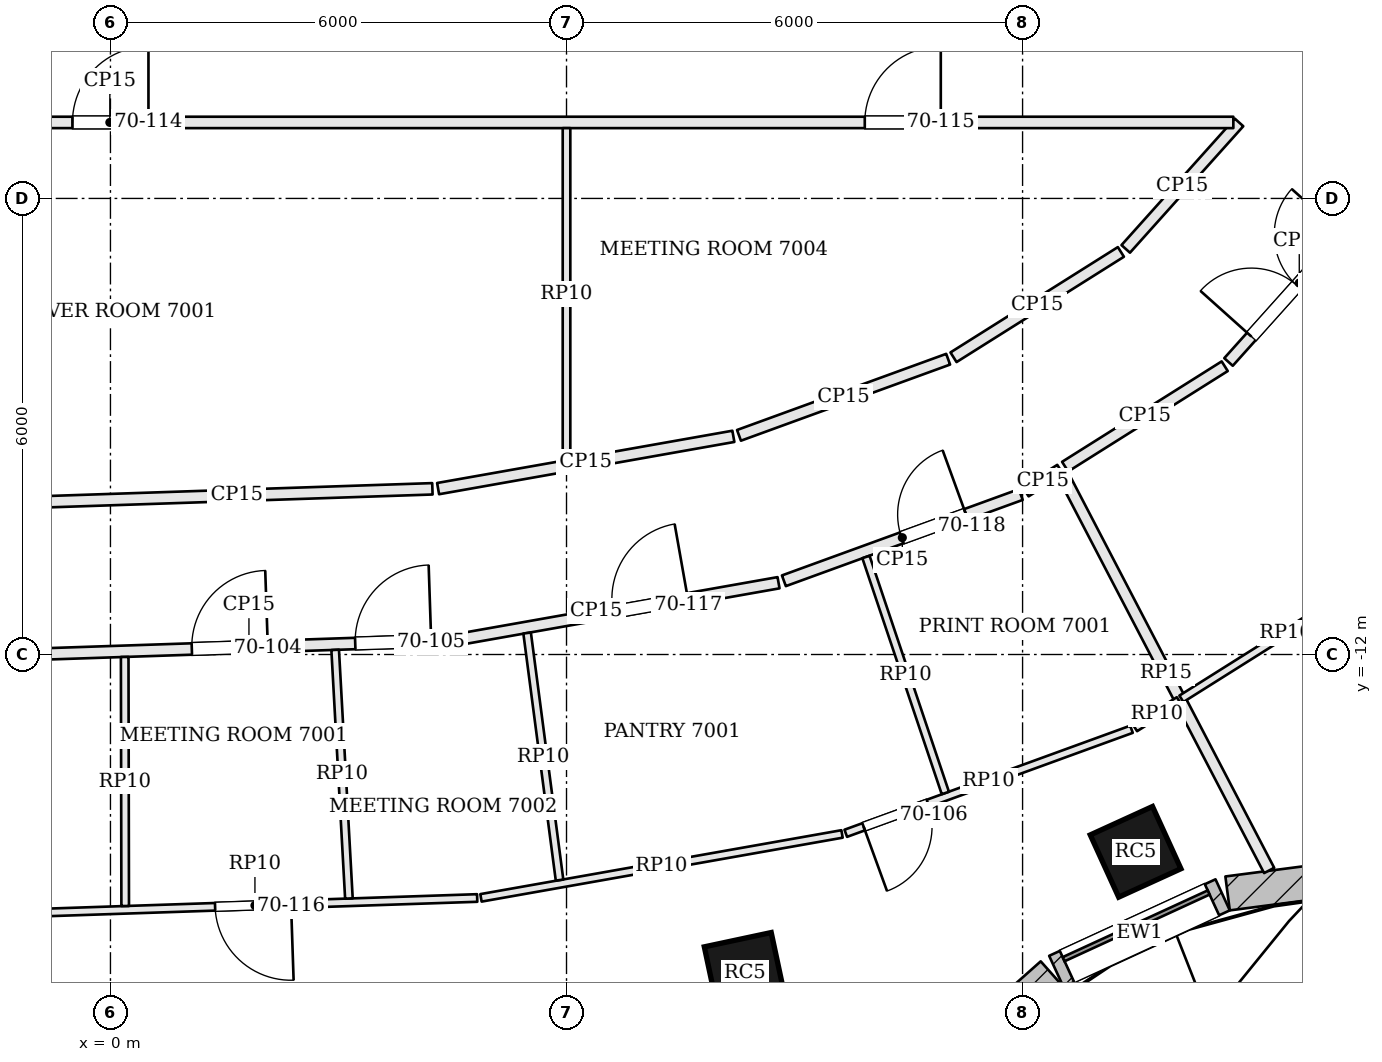
"""IFC4 building model, lengths in metres.
Left out: names, types, materials, properties, quantities, classifications, styles, units other than length and angle.
Written with IfcOpenShell. Run it as: python <this file> out.ifc"""

import sys

from ifc_helpers import new_model, si_unit, direction, frame, frame_2d, origin, origin_2d, place, context, subcontext, project, spatial, rectangle, extrude, element, fill, save


model = new_model("IFC4")
c1 = context("Model", 3, precision=1e-05, world=origin(), true_north=direction((0.0, 1.0)))
c2 = subcontext(c1, "Body", "Model", "MODEL_VIEW")
j1 = project(units=[si_unit("LENGTHUNIT", "METRE"), si_unit("PLANEANGLEUNIT", "RADIAN")], contexts=[c1])
p1 = place(None, origin())
s1 = spatial("IfcSite", under=j1, at=p1, CompositionType="ELEMENT")
p2 = place(p1, origin())
s2 = spatial("IfcBuilding", under=s1, at=p2, CompositionType="ELEMENT")
p3 = place(p2, frame((0.0, 0.0, 284.4)))
s3 = spatial("IfcBuildingStorey", under=s2, at=p3, CompositionType="ELEMENT", Elevation=284.4)
for number, where, z_axis, x_axis in (
    (1, (8.347, -16.192, 0.0), (0.0, 0.0, 1.0), (0.978, 0.209, 0.0)),
    (2, (13.487, -14.596, 0.0), (0.0, 0.0, 1.0), (0.91, 0.415, 0.0)),
):
    element("IfcColumn", number, at=place(p3, frame(where, z_axis=z_axis, x_axis=x_axis)), inside=s3, PredefinedType="COLUMN", context=c2, shape_type="SweptSolid", body=[
        extrude(rectangle(XDim=0.9, YDim=0.9, at=origin_2d()), origin(), (0.0, 0.0, 1.0), 3.9),
    ])
p4 = place(p3, frame((9.21, -19.03, 0.0), z_axis=(0.0, 0.0, 1.0), x_axis=(0.747396648191, 0.664378092861, 0.0)))
e3 = element("IfcWall", 3, at=p4, inside=s3, PredefinedType="SOLIDWALL", context=c2, shape_type="SweptSolid", body=[
    extrude(rectangle(XDim=4.252, YDim=0.45, at=frame_2d((2.126, 0.0))), origin(), (0.0, 0.0, 1.0), 3.7),
])
p5 = place(p4, frame((1.076, 0.0, 0.9)))
e4 = element("IfcOpeningElement", 4, at=p5, cuts=e3, PredefinedType="OPENING", context=c2, shape_type="SweptSolid", body=[
    extrude(rectangle(XDim=2.1, YDim=2.3, at=frame_2d((1.05, 1.15))), frame((0.0, 0.235, 0.0), z_axis=(0.0, -1.0, 0.0), x_axis=(1.0, 0.0, 0.0)), (0.0, 0.0, 1.0), 0.47),
])
p6 = place(p3, frame((12.444, -16.169, 0.0), z_axis=(0.0, 0.0, 1.0), x_axis=(0.908468904074, 0.417952449844, 0.0)))
e5 = element("IfcWall", 5, at=p6, inside=s3, PredefinedType="SOLIDWALL", context=c2, shape_type="SweptSolid", body=[
    extrude(rectangle(XDim=2.409, YDim=0.45, at=frame_2d((1.205, 0.0))), origin(), (0.0, 0.0, 1.0), 3.7),
])
p7 = place(p6, frame((0.155, 0.0, 0.9)))
e6 = element("IfcOpeningElement", 6, at=p7, cuts=e5, PredefinedType="OPENING", context=c2, shape_type="SweptSolid", body=[
    extrude(rectangle(XDim=2.1, YDim=2.3, at=frame_2d((1.05, 1.15))), frame((0.0, 0.235, 0.0), z_axis=(0.0, -1.0, 0.0), x_axis=(1.0, 0.0, 0.0)), (0.0, 0.0, 1.0), 0.47),
])
p8 = place(p3, frame((14.697, -15.143, 0.0), z_axis=(0.0, 0.0, 1.0), x_axis=(0.991631798411, 0.129098320597, 0.0)))
e7 = element("IfcWall", 7, at=p8, inside=s3, PredefinedType="SOLIDWALL", context=c2, shape_type="SweptSolid", body=[
    extrude(rectangle(XDim=5.547, YDim=0.45, at=frame_2d((2.773, 0.0))), origin(), (0.0, 0.0, 1.0), 3.7),
])
p9 = place(p8, frame((1.723, 0.0, 0.9)))
e8 = element("IfcOpeningElement", 8, at=p9, cuts=e7, PredefinedType="OPENING", context=c2, shape_type="SweptSolid", body=[
    extrude(rectangle(XDim=2.1, YDim=2.3, at=frame_2d((1.05, 1.15))), frame((0.0, 0.235, 0.0), z_axis=(0.0, -1.0, 0.0), x_axis=(1.0, 0.0, 0.0)), (0.0, 0.0, 1.0), 0.47),
])
p10 = place(p3, frame((-0.875, -11.993, 0.0), z_axis=(0.0, 0.0, 1.0), x_axis=(0.999436745295, 0.033558786542, 0.0)))
e9 = element("IfcWall", 9, at=p10, inside=s3, PredefinedType="PARTITIONING", context=c2, shape_type="SweptSolid", body=[
    extrude(rectangle(XDim=5.398, YDim=0.15, at=frame_2d((2.699, 0.0))), origin(), (0.0, 0.0, 1.0), 3.198),
])
p11 = place(p10, frame((1.947, 0.0, 0.0)))
e10 = element("IfcOpeningElement", 10, at=p11, cuts=e9, PredefinedType="OPENING", context=c2, shape_type="SweptSolid", body=[
    extrude(rectangle(XDim=1.0, YDim=2.4, at=frame_2d((0.5, 1.2))), frame((0.0, 0.085, 0.0), z_axis=(0.0, -1.0, 0.0), x_axis=(1.0, 0.0, 0.0)), (0.0, 0.0, 1.0), 0.17),
])
p12 = place(p10, frame((4.098, 0.0, 0.0)))
e11 = element("IfcOpeningElement", 11, at=p12, cuts=e9, PredefinedType="OPENING", context=c2, shape_type="SweptSolid", body=[
    extrude(rectangle(XDim=1.0, YDim=2.4, at=frame_2d((0.5, 1.2))), frame((0.0, 0.085, 0.0), z_axis=(0.0, -1.0, 0.0), x_axis=(1.0, 0.0, 0.0)), (0.0, 0.0, 1.0), 0.17),
])
p13 = place(p3, frame((4.594, -11.799, 0.0), z_axis=(0.0, 0.0, 1.0), x_axis=(0.984693444773, 0.174295208833, 0.0)))
e12 = element("IfcWall", 12, at=p13, inside=s3, PredefinedType="PARTITIONING", context=c2, shape_type="SweptSolid", body=[
    extrude(rectangle(XDim=4.261, YDim=0.15, at=frame_2d((2.13, 0.0))), origin(), (0.0, 0.0, 1.0), 3.198),
])
p14 = place(p13, frame((2.05, 0.0, 0.0)))
e13 = element("IfcOpeningElement", 13, at=p14, cuts=e12, PredefinedType="OPENING", context=c2, shape_type="SweptSolid", body=[
    extrude(rectangle(XDim=1.0, YDim=2.1, at=frame_2d((0.5, 1.05))), frame((0.0, 0.085, 0.0), z_axis=(0.0, -1.0, 0.0), x_axis=(1.0, 0.0, 0.0)), (0.0, 0.0, 1.0), 0.17),
])
p15 = place(p3, frame((8.86, -11.03, 0.0), z_axis=(0.0, 0.0, 1.0), x_axis=(0.939685902536, 0.342038601001, 0.0)))
e14 = element("IfcWall", 14, at=p15, inside=s3, PredefinedType="PARTITIONING", context=c2, shape_type="SweptSolid", body=[
    extrude(rectangle(XDim=3.316, YDim=0.15, at=frame_2d((1.658, 0.0))), origin(), (0.0, 0.0, 1.0), 3.198),
])
p16 = place(p15, frame((1.65, 0.0, 0.0)))
e15 = element("IfcOpeningElement", 15, at=p16, cuts=e14, PredefinedType="OPENING", context=c2, shape_type="SweptSolid", body=[
    extrude(rectangle(XDim=0.9, YDim=2.1, at=frame_2d((0.45, 1.05))), frame((0.0, 0.085, 0.0), z_axis=(0.0, -1.0, 0.0), x_axis=(1.0, 0.0, 0.0)), (0.0, 0.0, 1.0), 0.17),
])
p17 = place(p3, frame((12.04, -9.856, 0.0), z_axis=(0.0, 0.0, 1.0), x_axis=(0.846240393033, 0.532801273647, 0.0)))
e16 = element("IfcWall", 16, at=p17, inside=s3, PredefinedType="PARTITIONING", context=c2, shape_type="SweptSolid", body=[
    extrude(rectangle(XDim=0.54, YDim=0.15, at=frame_2d((0.27, 0.0))), origin(), (0.0, 0.0, 1.0), 3.198),
])
p18 = place(p3, frame((15.244, -14.841, 0.0), z_axis=(0.0, 0.0, 1.0), x_axis=(-0.462122511499, 0.886816093881, 0.0)))
e17 = element("IfcWall", 17, at=p18, inside=s3, PredefinedType="PARTITIONING", context=c2, shape_type="SweptSolid", body=[
    extrude(rectangle(XDim=5.871, YDim=0.15, at=frame_2d((2.935, 0.0))), origin(), (0.0, 0.0, 1.0), 3.234),
])
p19 = place(p3, frame((12.56, -9.529, 0.0), z_axis=(0.0, 0.0, 1.0), x_axis=(0.846402081662, 0.53254437952, 0.0)))
e18 = element("IfcWall", 18, at=p19, inside=s3, PredefinedType="PARTITIONING", context=c2, shape_type="SweptSolid", body=[
    extrude(rectangle(XDim=2.481, YDim=0.15, at=frame_2d((1.24, 0.0))), origin(), (0.0, 0.0, 1.0), 3.198),
])
p20 = place(p3, frame((14.709, -8.152, 0.0), z_axis=(0.0, 0.0, 1.0), x_axis=(0.667275630306, 0.744810870758, 0.0)))
e19 = element("IfcWall", 19, at=p20, inside=s3, PredefinedType="PARTITIONING", context=c2, shape_type="SweptSolid", body=[
    extrude(rectangle(XDim=2.79, YDim=0.15, at=frame_2d((1.395, 0.0))), origin(), (0.0, 0.0, 1.0), 3.198),
])
p21 = place(p20, frame((0.45, 0.0, 0.0)))
e20 = element("IfcOpeningElement", 20, at=p21, cuts=e19, PredefinedType="OPENING", context=c2, shape_type="SweptSolid", body=[
    extrude(rectangle(XDim=1.8, YDim=2.1, at=frame_2d((0.9, 1.05))), frame((0.0, 0.085, 0.0), z_axis=(0.0, -1.0, 0.0), x_axis=(1.0, 0.0, 0.0)), (0.0, 0.0, 1.0), 0.17),
])
p22 = place(p3, frame((14.848, -5.0, 0.0), z_axis=(0.0, 0.0, 1.0), x_axis=(-0.667363249373, -0.744732363595, 0.0)))
e21 = element("IfcWall", 21, at=p22, inside=s3, PredefinedType="PARTITIONING", context=c2, shape_type="SweptSolid", body=[
    extrude(rectangle(XDim=2.234, YDim=0.15, at=frame_2d((1.117, 0.0))), origin(), (0.0, 0.0, 1.0), 3.198),
])
p23 = place(p3, frame((13.293, -6.704, 0.0), z_axis=(0.0, 0.0, 1.0), x_axis=(-0.84641299998, -0.532527026041, 0.0)))
e22 = element("IfcWall", 22, at=p23, inside=s3, PredefinedType="PARTITIONING", context=c2, shape_type="SweptSolid", body=[
    extrude(rectangle(XDim=2.602, YDim=0.15, at=frame_2d((1.301, 0.0))), origin(), (0.0, 0.0, 1.0), 3.198),
])
p24 = place(p3, frame((11.021, -8.115, 0.0), z_axis=(0.0, 0.0, 1.0), x_axis=(-0.939683845313, -0.342044252778, 0.0)))
e23 = element("IfcWall", 23, at=p24, inside=s3, PredefinedType="PARTITIONING", context=c2, shape_type="SweptSolid", body=[
    extrude(rectangle(XDim=2.929, YDim=0.15, at=frame_2d((1.464, 0.0))), origin(), (0.0, 0.0, 1.0), 3.198),
])
p25 = place(p3, frame((8.195, -9.13, 0.0), z_axis=(0.0, 0.0, 1.0), x_axis=(-0.9846880937, -0.174325437403, 0.0)))
e24 = element("IfcWall", 24, at=p25, inside=s3, PredefinedType="PARTITIONING", context=c2, shape_type="SweptSolid", body=[
    extrude(rectangle(XDim=3.945, YDim=0.15, at=frame_2d((1.973, 0.0))), origin(), (0.0, 0.0, 1.0), 3.198),
])
p26 = place(p3, frame((4.236, -9.82, 0.0), z_axis=(0.0, 0.0, 1.0), x_axis=(-0.999435760561, -0.033588100749, 0.0)))
e25 = element("IfcWall", 25, at=p26, inside=s3, PredefinedType="PARTITIONING", context=c2, shape_type="SweptSolid", body=[
    extrude(rectangle(XDim=5.146, YDim=0.15, at=frame_2d((2.573, 0.0))), origin(), (0.0, 0.0, 1.0), 3.198),
])
p27 = place(p3, frame((-14.789, -5.0, 0.0), z_axis=(0.0, 0.0, 1.0), x_axis=(1.0, 0.0, 0.0)))
e26 = element("IfcWall", 26, at=p27, inside=s3, PredefinedType="PARTITIONING", context=c2, shape_type="SweptSolid", body=[
    extrude(rectangle(XDim=29.562, YDim=0.15, at=frame_2d((14.781, 0.0))), origin(), (0.0, 0.0, 1.0), 3.198),
])
p28 = place(p27, frame((3.857, 0.0, 0.0)))
e27 = element("IfcOpeningElement", 27, at=p28, cuts=e26, PredefinedType="OPENING", context=c2, shape_type="SweptSolid", body=[
    extrude(rectangle(XDim=1.0, YDim=2.4, at=frame_2d((0.5, 1.2))), frame((0.0, 0.085, 0.0), z_axis=(0.0, -1.0, 0.0), x_axis=(1.0, 0.0, 0.0)), (0.0, 0.0, 1.0), 0.17),
])
p29 = place(p27, frame((14.289, 0.0, 0.0)))
e28 = element("IfcOpeningElement", 28, at=p29, cuts=e26, PredefinedType="OPENING", context=c2, shape_type="SweptSolid", body=[
    extrude(rectangle(XDim=1.0, YDim=2.1, at=frame_2d((0.5, 1.05))), frame((0.0, 0.085, 0.0), z_axis=(0.0, -1.0, 0.0), x_axis=(1.0, 0.0, 0.0)), (0.0, 0.0, 1.0), 0.17),
])
p30 = place(p27, frame((24.713, 0.0, 0.0)))
e29 = element("IfcOpeningElement", 29, at=p30, cuts=e26, PredefinedType="OPENING", context=c2, shape_type="SweptSolid", body=[
    extrude(rectangle(XDim=1.0, YDim=2.4, at=frame_2d((0.5, 1.2))), frame((0.0, 0.085, 0.0), z_axis=(0.0, -1.0, 0.0), x_axis=(1.0, 0.0, 0.0)), (0.0, 0.0, 1.0), 0.17),
])
p31 = place(p3, frame((14.056, -12.604, 0.0), z_axis=(0.0, 0.0, 1.0), x_axis=(-0.846544184051, -0.532318461496, 0.0)))
e30 = element("IfcWall", 30, at=p31, inside=s3, PredefinedType="PARTITIONING", context=c2, shape_type="SweptSolid", body=[
    extrude(rectangle(XDim=0.681, YDim=0.1, at=frame_2d((0.34, 0.0))), origin(), (0.0, 0.0, 1.0), 3.198),
])
p32 = place(p3, frame((13.433, -12.984, 0.0), z_axis=(0.0, 0.0, 1.0), x_axis=(-0.939673979614, -0.342071355182, 0.0)))
e31 = element("IfcWall", 31, at=p32, inside=s3, PredefinedType="PARTITIONING", context=c2, shape_type="SweptSolid", body=[
    extrude(rectangle(XDim=4.0, YDim=0.1, at=frame_2d((2.0, 0.0))), origin(), (0.0, 0.0, 1.0), 3.198),
])
p33 = place(p32, frame((2.85, 0.0, 0.0)))
e32 = element("IfcOpeningElement", 32, at=p33, cuts=e31, PredefinedType="OPENING", context=c2, shape_type="SweptSolid", body=[
    extrude(rectangle(XDim=0.9, YDim=2.1, at=frame_2d((0.45, 1.05))), frame((0.0, 0.06, 0.0), z_axis=(0.0, -1.0, 0.0), x_axis=(1.0, 0.0, 0.0)), (0.0, 0.0, 1.0), 0.12),
])
p34 = place(p3, frame((9.625, -14.361, 0.0), z_axis=(0.0, 0.0, 1.0), x_axis=(-0.984691710098, -0.174305008716, 0.0)))
e33 = element("IfcWall", 33, at=p34, inside=s3, PredefinedType="PARTITIONING", context=c2, shape_type="SweptSolid", body=[
    extrude(rectangle(XDim=4.824, YDim=0.1, at=frame_2d((2.412, 0.0))), origin(), (0.0, 0.0, 1.0), 3.198),
])
p35 = place(p3, frame((4.825, -15.203, 0.0), z_axis=(0.0, 0.0, 1.0), x_axis=(-0.999435699456, -0.033589918924, 0.0)))
e34 = element("IfcWall", 34, at=p35, inside=s3, PredefinedType="PARTITIONING", context=c2, shape_type="SweptSolid", body=[
    extrude(rectangle(XDim=5.851, YDim=0.1, at=frame_2d((2.926, 0.0))), origin(), (0.0, 0.0, 1.0), 3.198),
])
p36 = place(p35, frame((2.45, 0.0, 0.0)))
e35 = element("IfcOpeningElement", 35, at=p36, cuts=e34, PredefinedType="OPENING", context=c2, shape_type="SweptSolid", body=[
    extrude(rectangle(XDim=1.0, YDim=2.4, at=frame_2d((0.5, 1.2))), frame((0.0, 0.06, 0.0), z_axis=(0.0, -1.0, 0.0), x_axis=(1.0, 0.0, 0.0)), (0.0, 0.0, 1.0), 0.12),
])
p37 = place(p3, frame((0.188, -12.032, 0.0), z_axis=(0.0, 0.0, 1.0), x_axis=(0.001937258864, -0.999998123512, 0.0)))
e36 = element("IfcWall", 36, at=p37, inside=s3, PredefinedType="PARTITIONING", context=c2, shape_type="SweptSolid", body=[
    extrude(rectangle(XDim=3.277, YDim=0.1, at=frame_2d((1.638, 0.0))), origin(), (0.0, 0.0, 1.0), 3.198),
])
p38 = place(p3, frame((2.956, -11.939, 0.0), z_axis=(0.0, 0.0, 1.0), x_axis=(0.055226477976, -0.998473853504, 0.0)))
e37 = element("IfcWall", 37, at=p38, inside=s3, PredefinedType="PARTITIONING", context=c2, shape_type="SweptSolid", body=[
    extrude(rectangle(XDim=3.276, YDim=0.1, at=frame_2d((1.638, 0.0))), origin(), (0.0, 0.0, 1.0), 3.198),
])
p39 = place(p3, frame((5.482, -11.718, 0.0), z_axis=(0.0, 0.0, 1.0), x_axis=(0.130173255727, -0.991491262439, 0.0)))
e38 = element("IfcWall", 38, at=p39, inside=s3, PredefinedType="PARTITIONING", context=c2, shape_type="SweptSolid", body=[
    extrude(rectangle(XDim=3.278, YDim=0.1, at=frame_2d((1.639, 0.0))), origin(), (0.0, 0.0, 1.0), 3.198),
])
p40 = place(p3, frame((9.94, -10.717, 0.0), z_axis=(0.0, 0.0, 1.0), x_axis=(0.318730603816, -0.947845347191, 0.0)))
e39 = element("IfcWall", 39, at=p40, inside=s3, PredefinedType="PARTITIONING", context=c2, shape_type="SweptSolid", body=[
    extrude(rectangle(XDim=3.276, YDim=0.1, at=frame_2d((1.638, 0.0))), origin(), (0.0, 0.0, 1.0), 3.198),
])
p41 = place(p3, frame((16.831, -10.858, 0.0), z_axis=(0.0, 0.0, 1.0), x_axis=(-0.846427876971, -0.532503379413, 0.0)))
e40 = element("IfcWall", 40, at=p41, inside=s3, PredefinedType="PARTITIONING", context=c2, shape_type="SweptSolid", body=[
    extrude(rectangle(XDim=3.239, YDim=0.1, at=frame_2d((1.62, 0.0))), origin(), (0.0, 0.0, 1.0), 3.198),
])
p42 = place(p3, frame((6.0, -9.444, 0.0), z_axis=(0.0, 0.0, 1.0), x_axis=(0.0, 1.0, 0.0)))
e41 = element("IfcWall", 41, at=p42, inside=s3, PredefinedType="PARTITIONING", context=c2, shape_type="SweptSolid", body=[
    extrude(rectangle(XDim=4.369, YDim=0.1, at=frame_2d((2.184, 0.0))), origin(), (0.0, 0.0, 1.0), 3.198),
])
p43 = place(p7, origin())
e42 = element("IfcWindow", 42, at=p43, inside=s3, PartitioningType="SINGLE_PANEL", PredefinedType="WINDOW", context=c2, shape_type="SweptSolid", body=[
    extrude(rectangle(XDim=2.1, YDim=2.3, at=frame_2d((1.05, 1.15))), frame((0.0, 0.135, 0.0), z_axis=(0.0, -1.0, 0.0), x_axis=(1.0, 0.0, 0.0)), (0.0, 0.0, 1.0), 0.06),
])
fill(e6, e42)
p44 = place(p11, origin())
e43 = element("IfcDoor", 43, at=p44, inside=s3, OperationType="SINGLE_SWING_RIGHT", PredefinedType="DOOR", context=c2, shape_type="SweptSolid", body=[
    extrude(rectangle(XDim=1.0, YDim=2.4, at=frame_2d((0.5, 1.2))), frame((0.0, 0.025, 0.0), z_axis=(0.0, -1.0, 0.0), x_axis=(1.0, 0.0, 0.0)), (0.0, 0.0, 1.0), 0.05),
])
fill(e10, e43)
p45 = place(p12, origin())
e44 = element("IfcDoor", 44, at=p45, inside=s3, OperationType="SINGLE_SWING_RIGHT", PredefinedType="DOOR", context=c2, shape_type="SweptSolid", body=[
    extrude(rectangle(XDim=1.0, YDim=2.4, at=frame_2d((0.5, 1.2))), frame((0.0, 0.025, 0.0), z_axis=(0.0, -1.0, 0.0), x_axis=(1.0, 0.0, 0.0)), (0.0, 0.0, 1.0), 0.05),
])
fill(e11, e44)
p46 = place(p33, origin())
e45 = element("IfcDoor", 45, at=p46, inside=s3, OperationType="SINGLE_SWING_RIGHT", PredefinedType="DOOR", context=c2, shape_type="SweptSolid", body=[
    extrude(rectangle(XDim=0.9, YDim=2.1, at=frame_2d((0.45, 1.05))), frame((0.0, 0.025, 0.0), z_axis=(0.0, -1.0, 0.0), x_axis=(1.0, 0.0, 0.0)), (0.0, 0.0, 1.0), 0.05),
])
fill(e32, e45)
p47 = place(p21, origin())
e46 = element("IfcDoor", 46, at=p47, inside=s3, OperationType="DOUBLE_DOOR_SINGLE_SWING", PredefinedType="DOOR", context=c2, shape_type="SweptSolid", body=[
    extrude(rectangle(XDim=1.8, YDim=2.1, at=frame_2d((0.9, 1.05))), frame((0.0, 0.025, 0.0), z_axis=(0.0, -1.0, 0.0), x_axis=(1.0, 0.0, 0.0)), (0.0, 0.0, 1.0), 0.05),
])
fill(e20, e46)
p48 = place(p29, origin())
e47 = element("IfcDoor", 47, at=p48, inside=s3, OperationType="SINGLE_SWING_RIGHT", PredefinedType="DOOR", context=c2, shape_type="SweptSolid", body=[
    extrude(rectangle(XDim=1.0, YDim=2.1, at=frame_2d((0.5, 1.05))), frame((0.0, 0.025, 0.0), z_axis=(0.0, -1.0, 0.0), x_axis=(1.0, 0.0, 0.0)), (0.0, 0.0, 1.0), 0.05),
])
fill(e28, e47)
p49 = place(p30, origin())
e48 = element("IfcDoor", 48, at=p49, inside=s3, OperationType="SINGLE_SWING_RIGHT", PredefinedType="DOOR", context=c2, shape_type="SweptSolid", body=[
    extrude(rectangle(XDim=1.0, YDim=2.4, at=frame_2d((0.5, 1.2))), frame((0.0, 0.025, 0.0), z_axis=(0.0, -1.0, 0.0), x_axis=(1.0, 0.0, 0.0)), (0.0, 0.0, 1.0), 0.05),
])
fill(e29, e48)
p50 = place(p36, origin())
e49 = element("IfcDoor", 49, at=p50, inside=s3, OperationType="SINGLE_SWING_LEFT", PredefinedType="DOOR", context=c2, shape_type="SweptSolid", body=[
    extrude(rectangle(XDim=1.0, YDim=2.4, at=frame_2d((0.5, 1.2))), frame((0.0, 0.025, 0.0), z_axis=(0.0, -1.0, 0.0), x_axis=(1.0, 0.0, 0.0)), (0.0, 0.0, 1.0), 0.05),
])
fill(e35, e49)
p51 = place(p14, origin())
e50 = element("IfcDoor", 50, at=p51, inside=s3, OperationType="SINGLE_SWING_RIGHT", PredefinedType="DOOR", context=c2, shape_type="SweptSolid", body=[
    extrude(rectangle(XDim=1.0, YDim=2.1, at=frame_2d((0.5, 1.05))), frame((0.0, 0.025, 0.0), z_axis=(0.0, -1.0, 0.0), x_axis=(1.0, 0.0, 0.0)), (0.0, 0.0, 1.0), 0.05),
])
fill(e13, e50)
p52 = place(p16, origin())
e51 = element("IfcDoor", 51, at=p52, inside=s3, OperationType="SINGLE_SWING_RIGHT", PredefinedType="DOOR", context=c2, shape_type="SweptSolid", body=[
    extrude(rectangle(XDim=0.9, YDim=2.1, at=frame_2d((0.45, 1.05))), frame((0.0, 0.025, 0.0), z_axis=(0.0, -1.0, 0.0), x_axis=(1.0, 0.0, 0.0)), (0.0, 0.0, 1.0), 0.05),
])
fill(e15, e51)
save(model, sys.argv[1])
